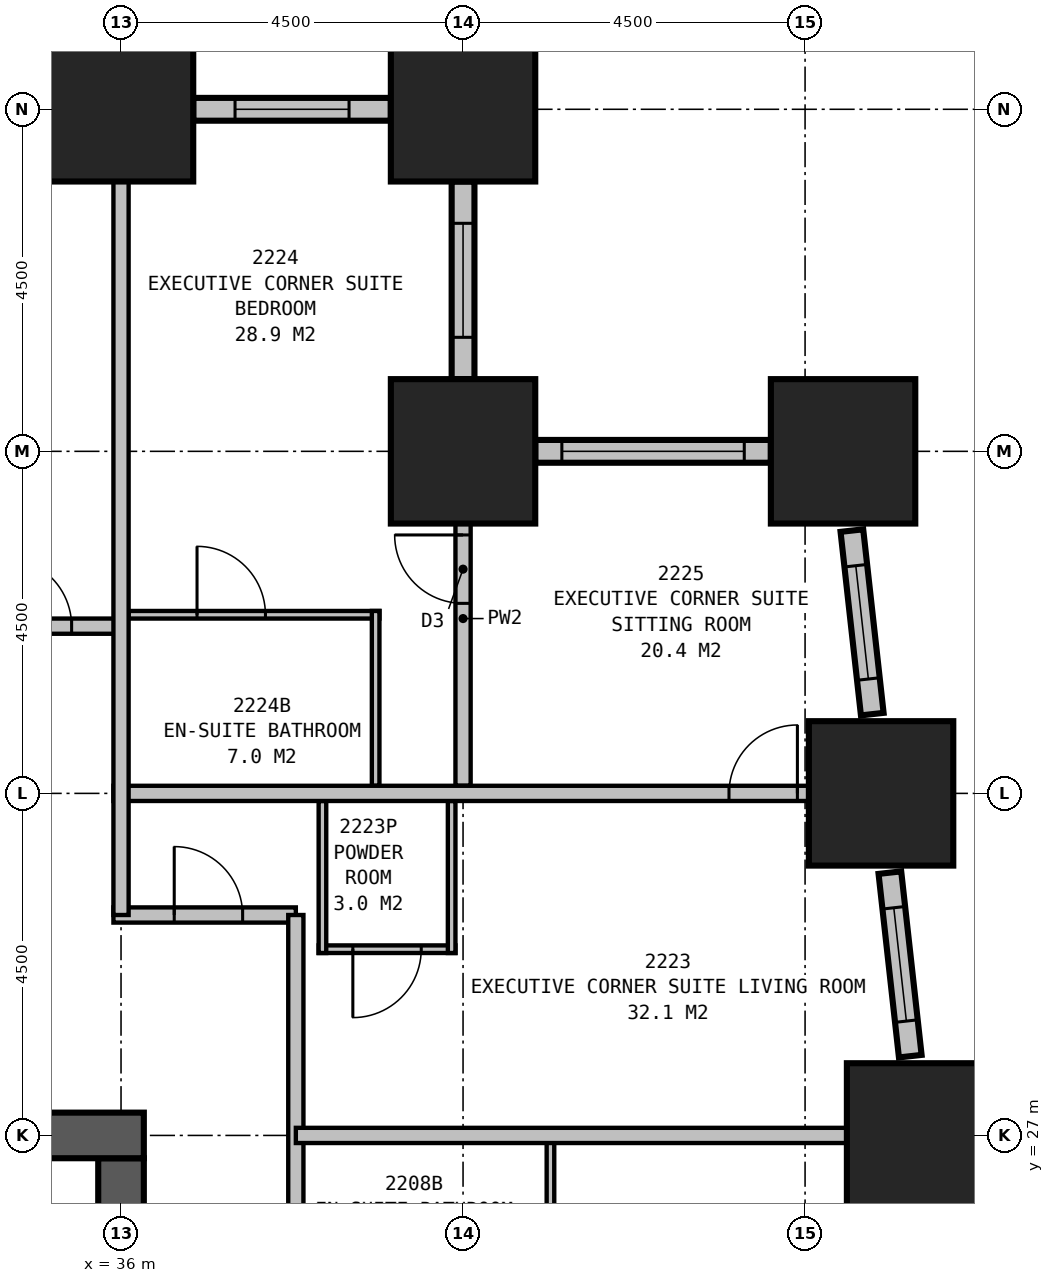
"""IFC4 building model, lengths in metres.
Left out: names, types, materials, properties, quantities, classifications, styles, units other than length and angle.
Written with IfcOpenShell. Run it as: python <this file> out.ifc"""

import sys

from ifc_helpers import new_model, si_unit, direction, frame, frame_2d, origin, origin_2d, place, context, subcontext, project, spatial, rectangle, extrude, element, fill, save


model = new_model("IFC4")
c1 = context("Model", 3, precision=1e-05, world=origin(), true_north=direction((0.0, 1.0)))
c2 = subcontext(c1, "Body", "Model", "MODEL_VIEW")
j1 = project(units=[si_unit("LENGTHUNIT", "METRE"), si_unit("PLANEANGLEUNIT", "RADIAN")], contexts=[c1])
p1 = place(None, origin())
s1 = spatial("IfcSite", under=j1, at=p1, CompositionType="ELEMENT")
p2 = place(p1, origin())
s2 = spatial("IfcBuilding", under=s1, at=p2, CompositionType="ELEMENT")
p3 = place(p2, frame((0.0, 0.0, 89.9)))
s3 = spatial("IfcBuildingStorey", under=s2, at=p3, CompositionType="ELEMENT", Elevation=89.9)
for number, where, z_axis, x_axis in (
    (1, (46.5, 27.0, 0.0), (0.0, 0.0, 1.0), (1.0, 0.0, 0.0)),
    (2, (46.0, 31.5, 0.0), (0.0, 0.0, 1.0), (1.0, 0.0, 0.0)),
    (3, (45.5, 36.0, 0.0), (0.0, 0.0, 1.0), (1.0, 0.0, 0.0)),
    (4, (40.5, 36.0, 0.0), (0.0, 0.0, 1.0), (1.0, 0.0, 0.0)),
    (5, (40.5, 40.5, 0.0), (0.0, 0.0, 1.0), (1.0, 0.0, 0.0)),
    (6, (36.0, 40.5, 0.0), (0.0, 0.0, 1.0), (1.0, 0.0, 0.0)),
):
    element("IfcColumn", number, at=place(p3, frame(where, z_axis=z_axis, x_axis=x_axis)), inside=s3, PredefinedType="COLUMN", context=c2, shape_type="SweptSolid", body=[
        extrude(rectangle(XDim=1.9, YDim=1.9, at=origin_2d()), origin(), (0.0, 0.0, 1.0), 3.5),
    ])
p4 = place(p3, frame((36.3, 27.0, 0.0), z_axis=(0.0, 0.0, 1.0), x_axis=(-1.0, 0.0, 0.0)))
e7 = element("IfcWall", 7, at=p4, inside=s3, PredefinedType="SHEAR", context=c2, shape_type="SweptSolid", body=[
    extrude(rectangle(XDim=23.1, YDim=0.6, at=frame_2d((11.55, 0.0))), origin(), (0.0, 0.0, 1.0), 3.5),
])
p5 = place(p4, frame((17.05, 0.0, 0.0)))
e8 = element("IfcOpeningElement", 8, at=p5, cuts=e7, PredefinedType="OPENING", context=c2, shape_type="SweptSolid", body=[
    extrude(rectangle(XDim=1.0, YDim=2.1, at=frame_2d((0.5, 1.05))), frame((0.0, 0.31, 0.0), z_axis=(0.0, -1.0, 0.0), x_axis=(1.0, 0.0, 0.0)), (0.0, 0.0, 1.0), 0.62),
])
p6 = place(p4, frame((12.05, 0.0, 0.0)))
e9 = element("IfcOpeningElement", 9, at=p6, cuts=e7, PredefinedType="OPENING", context=c2, shape_type="SweptSolid", body=[
    extrude(rectangle(XDim=1.0, YDim=2.1, at=frame_2d((0.5, 1.05))), frame((0.0, 0.31, 0.0), z_axis=(0.0, -1.0, 0.0), x_axis=(1.0, 0.0, 0.0)), (0.0, 0.0, 1.0), 0.62),
])
p7 = place(p4, frame((7.05, 0.0, 0.0)))
e10 = element("IfcOpeningElement", 10, at=p7, cuts=e7, PredefinedType="OPENING", context=c2, shape_type="SweptSolid", body=[
    extrude(rectangle(XDim=1.0, YDim=2.1, at=frame_2d((0.5, 1.05))), frame((0.0, 0.31, 0.0), z_axis=(0.0, -1.0, 0.0), x_axis=(1.0, 0.0, 0.0)), (0.0, 0.0, 1.0), 0.62),
])
p8 = place(p3, frame((36.0, 20.0, 0.0), z_axis=(0.0, 0.0, 1.0), x_axis=(0.0, 1.0, 0.0)))
e11 = element("IfcWall", 11, at=p8, inside=s3, PredefinedType="SHEAR", context=c2, shape_type="SweptSolid", body=[
    extrude(rectangle(XDim=6.7, YDim=0.6, at=frame_2d((3.35, 0.0))), origin(), (0.0, 0.0, 1.0), 3.5),
])
p9 = place(p3, frame((46.384, 28.043, 0.0), z_axis=(0.0, 0.0, 1.0), x_axis=(-0.110343286306, 0.993893535127, 0.0)))
e12 = element("IfcWall", 12, at=p9, inside=s3, PredefinedType="STANDARD", context=c2, shape_type="SweptSolid", body=[
    extrude(rectangle(XDim=2.429, YDim=0.3, at=frame_2d((1.215, 0.0))), origin(), (0.0, 0.0, 1.0), 2.15),
])
p10 = place(p9, frame((0.464, 0.0, 0.5)))
e13 = element("IfcOpeningElement", 13, at=p10, cuts=e12, PredefinedType="OPENING", context=c2, shape_type="SweptSolid", body=[
    extrude(rectangle(XDim=1.5, YDim=1.5, at=frame_2d((0.75, 0.75))), frame((0.0, 0.16, 0.0), z_axis=(0.0, -1.0, 0.0), x_axis=(1.0, 0.0, 0.0)), (0.0, 0.0, 1.0), 0.32),
])
p11 = place(p3, frame((45.884, 32.543, 0.0), z_axis=(0.0, 0.0, 1.0), x_axis=(-0.110343286306, 0.993893535127, 0.0)))
e14 = element("IfcWall", 14, at=p11, inside=s3, PredefinedType="STANDARD", context=c2, shape_type="SweptSolid", body=[
    extrude(rectangle(XDim=2.429, YDim=0.3, at=frame_2d((1.215, 0.0))), origin(), (0.0, 0.0, 1.0), 2.15),
])
p12 = place(p11, frame((0.465, 0.0, 0.5)))
e15 = element("IfcOpeningElement", 15, at=p12, cuts=e14, PredefinedType="OPENING", context=c2, shape_type="SweptSolid", body=[
    extrude(rectangle(XDim=1.5, YDim=1.5, at=frame_2d((0.75, 0.75))), frame((0.0, 0.16, 0.0), z_axis=(0.0, -1.0, 0.0), x_axis=(1.0, 0.0, 0.0)), (0.0, 0.0, 1.0), 0.32),
])
p13 = place(p3, frame((44.55, 36.0, 0.0), z_axis=(0.0, 0.0, 1.0), x_axis=(-1.0, 0.0, 0.0)))
e16 = element("IfcWall", 16, at=p13, inside=s3, PredefinedType="STANDARD", context=c2, shape_type="SweptSolid", body=[
    extrude(rectangle(XDim=3.1, YDim=0.3, at=frame_2d((1.55, 0.0))), origin(), (0.0, 0.0, 1.0), 2.15),
])
p14 = place(p13, frame((0.35, 0.0, 0.5)))
e17 = element("IfcOpeningElement", 17, at=p14, cuts=e16, PredefinedType="OPENING", context=c2, shape_type="SweptSolid", body=[
    extrude(rectangle(XDim=2.4, YDim=1.5, at=frame_2d((1.2, 0.75))), frame((0.0, 0.16, 0.0), z_axis=(0.0, -1.0, 0.0), x_axis=(1.0, 0.0, 0.0)), (0.0, 0.0, 1.0), 0.32),
])
p15 = place(p3, frame((40.5, 36.95, 0.0), z_axis=(0.0, 0.0, 1.0), x_axis=(0.0, 1.0, 0.0)))
e18 = element("IfcWall", 18, at=p15, inside=s3, PredefinedType="STANDARD", context=c2, shape_type="SweptSolid", body=[
    extrude(rectangle(XDim=2.6, YDim=0.3, at=frame_2d((1.3, 0.0))), origin(), (0.0, 0.0, 1.0), 2.15),
])
p16 = place(p15, frame((0.55, 0.0, 0.5)))
e19 = element("IfcOpeningElement", 19, at=p16, cuts=e18, PredefinedType="OPENING", context=c2, shape_type="SweptSolid", body=[
    extrude(rectangle(XDim=1.5, YDim=1.5, at=frame_2d((0.75, 0.75))), frame((0.0, 0.16, 0.0), z_axis=(0.0, -1.0, 0.0), x_axis=(1.0, 0.0, 0.0)), (0.0, 0.0, 1.0), 0.32),
])
p17 = place(p3, frame((39.55, 40.5, 0.0), z_axis=(0.0, 0.0, 1.0), x_axis=(-1.0, 0.0, 0.0)))
e20 = element("IfcWall", 20, at=p17, inside=s3, PredefinedType="STANDARD", context=c2, shape_type="SweptSolid", body=[
    extrude(rectangle(XDim=2.6, YDim=0.3, at=frame_2d((1.3, 0.0))), origin(), (0.0, 0.0, 1.0), 2.15),
])
p18 = place(p17, frame((0.55, 0.0, 0.5)))
e21 = element("IfcOpeningElement", 21, at=p18, cuts=e20, PredefinedType="OPENING", context=c2, shape_type="SweptSolid", body=[
    extrude(rectangle(XDim=1.5, YDim=1.5, at=frame_2d((0.75, 0.75))), frame((0.0, 0.16, 0.0), z_axis=(0.0, -1.0, 0.0), x_axis=(1.0, 0.0, 0.0)), (0.0, 0.0, 1.0), 0.32),
])
p19 = place(p3, frame((13.5, 33.7, 0.0), z_axis=(0.0, 0.0, 1.0), x_axis=(1.0, 0.0, 0.0)))
e22 = element("IfcWall", 22, at=p19, inside=s3, PredefinedType="PARTITIONING", context=c2, shape_type="SweptSolid", body=[
    extrude(rectangle(XDim=22.5, YDim=0.2, at=frame_2d((11.25, 0.0))), origin(), (0.0, 0.0, 1.0), 3.25),
])
p20 = place(p19, frame((2.95, 0.0, 0.0)))
e23 = element("IfcOpeningElement", 23, at=p20, cuts=e22, PredefinedType="OPENING", context=c2, shape_type="SweptSolid", body=[
    extrude(rectangle(XDim=0.9, YDim=2.1, at=frame_2d((0.45, 1.05))), frame((0.0, 0.11, 0.0), z_axis=(0.0, -1.0, 0.0), x_axis=(1.0, 0.0, 0.0)), (0.0, 0.0, 1.0), 0.22),
])
p21 = place(p19, frame((7.45, 0.0, 0.0)))
e24 = element("IfcOpeningElement", 24, at=p21, cuts=e22, PredefinedType="OPENING", context=c2, shape_type="SweptSolid", body=[
    extrude(rectangle(XDim=0.9, YDim=2.1, at=frame_2d((0.45, 1.05))), frame((0.0, 0.11, 0.0), z_axis=(0.0, -1.0, 0.0), x_axis=(1.0, 0.0, 0.0)), (0.0, 0.0, 1.0), 0.22),
])
p22 = place(p19, frame((9.65, 0.0, 0.0)))
e25 = element("IfcOpeningElement", 25, at=p22, cuts=e22, PredefinedType="OPENING", context=c2, shape_type="SweptSolid", body=[
    extrude(rectangle(XDim=0.9, YDim=2.1, at=frame_2d((0.45, 1.05))), frame((0.0, 0.11, 0.0), z_axis=(0.0, -1.0, 0.0), x_axis=(1.0, 0.0, 0.0)), (0.0, 0.0, 1.0), 0.22),
])
p23 = place(p19, frame((16.45, 0.0, 0.0)))
e26 = element("IfcOpeningElement", 26, at=p23, cuts=e22, PredefinedType="OPENING", context=c2, shape_type="SweptSolid", body=[
    extrude(rectangle(XDim=0.9, YDim=2.1, at=frame_2d((0.45, 1.05))), frame((0.0, 0.11, 0.0), z_axis=(0.0, -1.0, 0.0), x_axis=(1.0, 0.0, 0.0)), (0.0, 0.0, 1.0), 0.22),
])
p24 = place(p19, frame((20.95, 0.0, 0.0)))
e27 = element("IfcOpeningElement", 27, at=p24, cuts=e22, PredefinedType="OPENING", context=c2, shape_type="SweptSolid", body=[
    extrude(rectangle(XDim=0.9, YDim=2.1, at=frame_2d((0.45, 1.05))), frame((0.0, 0.11, 0.0), z_axis=(0.0, -1.0, 0.0), x_axis=(1.0, 0.0, 0.0)), (0.0, 0.0, 1.0), 0.22),
])
p25 = place(p3, frame((35.9, 29.9, 0.0), z_axis=(0.0, 0.0, 1.0), x_axis=(1.0, 0.0, 0.0)))
e28 = element("IfcWall", 28, at=p25, inside=s3, PredefinedType="PARTITIONING", context=c2, shape_type="SweptSolid", body=[
    extrude(rectangle(XDim=2.4, YDim=0.2, at=frame_2d((1.2, 0.0))), origin(), (0.0, 0.0, 1.0), 3.25),
])
p26 = place(p25, frame((0.8, 0.0, 0.0)))
e29 = element("IfcOpeningElement", 29, at=p26, cuts=e28, PredefinedType="OPENING", context=c2, shape_type="SweptSolid", body=[
    extrude(rectangle(XDim=0.9, YDim=2.1, at=frame_2d((0.45, 1.05))), frame((0.0, 0.11, 0.0), z_axis=(0.0, -1.0, 0.0), x_axis=(1.0, 0.0, 0.0)), (0.0, 0.0, 1.0), 0.22),
])
p27 = place(p3, frame((38.3, 10.6, 0.0), z_axis=(0.0, 0.0, 1.0), x_axis=(0.0, 1.0, 0.0)))
e30 = element("IfcWall", 30, at=p27, inside=s3, PredefinedType="PARTITIONING", context=c2, shape_type="SweptSolid", body=[
    extrude(rectangle(XDim=19.3, YDim=0.2, at=frame_2d((9.65, 0.0))), origin(), (0.0, 0.0, 1.0), 3.25),
])
p28 = place(p27, frame((4.65, 0.0, 0.0), z_axis=(0.0, 0.0, 1.0), x_axis=(-1.0, 0.0, 0.0)))
e31 = element("IfcOpeningElement", 31, at=p28, cuts=e30, PredefinedType="OPENING", context=c2, shape_type="SweptSolid", body=[
    extrude(rectangle(XDim=1.0, YDim=2.1, at=frame_2d((0.5, 1.05))), frame((0.0, 0.11, 0.0), z_axis=(0.0, -1.0, 0.0), x_axis=(1.0, 0.0, 0.0)), (0.0, 0.0, 1.0), 0.22),
])
p29 = place(p27, frame((9.95, 0.0, 0.0), z_axis=(0.0, 0.0, 1.0), x_axis=(-1.0, 0.0, 0.0)))
e32 = element("IfcOpeningElement", 32, at=p29, cuts=e30, PredefinedType="OPENING", context=c2, shape_type="SweptSolid", body=[
    extrude(rectangle(XDim=0.9, YDim=2.1, at=frame_2d((0.45, 1.05))), frame((0.0, 0.11, 0.0), z_axis=(0.0, -1.0, 0.0), x_axis=(1.0, 0.0, 0.0)), (0.0, 0.0, 1.0), 0.22),
])
p30 = place(p3, frame((41.65, 24.0, 0.0), z_axis=(0.0, 0.0, 1.0), x_axis=(0.0, 1.0, 0.0)))
e33 = element("IfcWall", 33, at=p30, inside=s3, PredefinedType="PLUMBINGWALL", context=c2, shape_type="SweptSolid", body=[
    extrude(rectangle(XDim=3.0, YDim=0.1, at=frame_2d((1.5, 0.0))), origin(), (0.0, 0.0, 1.0), 3.25),
])
p31 = place(p3, frame((38.3, 27.0, 0.0), z_axis=(0.0, 0.0, 1.0), x_axis=(1.0, 0.0, 0.0)))
e34 = element("IfcWall", 34, at=p31, inside=s3, PredefinedType="PARTITIONING", context=c2, shape_type="SweptSolid", body=[
    extrude(rectangle(XDim=7.977, YDim=0.2, at=frame_2d((3.988, 0.0))), origin(), (0.0, 0.0, 1.0), 1.95),
])
p32 = place(p3, frame((36.0, 29.9, 0.0), z_axis=(0.0, 0.0, 1.0), x_axis=(0.0, 1.0, 0.0)))
e35 = element("IfcWall", 35, at=p32, inside=s3, PredefinedType="PARTITIONING", context=c2, shape_type="SweptSolid", body=[
    extrude(rectangle(XDim=10.6, YDim=0.2, at=frame_2d((5.3, 0.0))), origin(), (0.0, 0.0, 1.0), 2.25),
])
p33 = place(p3, frame((35.9, 31.5, 0.0), z_axis=(0.0, 0.0, 1.0), x_axis=(1.0, 0.0, 0.0)))
e36 = element("IfcWall", 36, at=p33, inside=s3, PredefinedType="PARTITIONING", context=c2, shape_type="SweptSolid", body=[
    extrude(rectangle(XDim=10.099, YDim=0.2, at=frame_2d((5.05, 0.0))), origin(), (0.0, 0.0, 1.0), 3.25),
])
p34 = place(p33, frame((8.099, 0.0, 0.0)))
e37 = element("IfcOpeningElement", 37, at=p34, cuts=e36, PredefinedType="OPENING", context=c2, shape_type="SweptSolid", body=[
    extrude(rectangle(XDim=0.9, YDim=2.1, at=frame_2d((0.45, 1.05))), frame((0.0, 0.11, 0.0), z_axis=(0.0, -1.0, 0.0), x_axis=(1.0, 0.0, 0.0)), (0.0, 0.0, 1.0), 0.22),
])
p35 = place(p3, frame((40.35, 31.4, 0.0), z_axis=(0.0, 0.0, 1.0), x_axis=(0.0, -1.0, 0.0)))
e38 = element("IfcWall", 38, at=p35, inside=s3, PredefinedType="PLUMBINGWALL", context=c2, shape_type="SweptSolid", body=[
    extrude(rectangle(XDim=2.0, YDim=0.1, at=frame_2d((1.0, 0.0))), origin(), (0.0, 0.0, 1.0), 2.25),
])
p36 = place(p3, frame((38.65, 31.4, 0.0), z_axis=(0.0, 0.0, 1.0), x_axis=(0.0, -1.0, 0.0)))
e39 = element("IfcWall", 39, at=p36, inside=s3, PredefinedType="PLUMBINGWALL", context=c2, shape_type="SweptSolid", body=[
    extrude(rectangle(XDim=2.0, YDim=0.1, at=frame_2d((1.0, 0.0))), origin(), (0.0, 0.0, 1.0), 3.25),
])
p37 = place(p3, frame((38.6, 29.45, 0.0), z_axis=(0.0, 0.0, 1.0), x_axis=(1.0, 0.0, 0.0)))
e40 = element("IfcWall", 40, at=p37, inside=s3, PredefinedType="PLUMBINGWALL", context=c2, shape_type="SweptSolid", body=[
    extrude(rectangle(XDim=1.8, YDim=0.1, at=frame_2d((0.9, 0.0))), origin(), (0.0, 0.0, 1.0), 3.25),
])
p38 = place(p37, frame((1.35, 0.0, 0.0), z_axis=(0.0, 0.0, 1.0), x_axis=(-1.0, 0.0, 0.0)))
e41 = element("IfcOpeningElement", 41, at=p38, cuts=e40, PredefinedType="OPENING", context=c2, shape_type="SweptSolid", body=[
    extrude(rectangle(XDim=0.9, YDim=2.1, at=frame_2d((0.45, 1.05))), frame((0.0, 0.06, 0.0), z_axis=(0.0, -1.0, 0.0), x_axis=(1.0, 0.0, 0.0)), (0.0, 0.0, 1.0), 0.12),
])
p39 = place(p3, frame((40.5, 31.6, 0.0), z_axis=(0.0, 0.0, 1.0), x_axis=(0.0, 1.0, 0.0)))
e42 = element("IfcWall", 42, at=p39, inside=s3, PredefinedType="PARTITIONING", context=c2, shape_type="SweptSolid", body=[
    extrude(rectangle(XDim=4.4, YDim=0.2, at=frame_2d((2.2, 0.0))), origin(), (0.0, 0.0, 1.0), 2.25),
])
p40 = place(p39, frame((2.4, 0.0, 0.0)))
e43 = element("IfcOpeningElement", 43, at=p40, cuts=e42, PredefinedType="OPENING", context=c2, shape_type="SweptSolid", body=[
    extrude(rectangle(XDim=0.9, YDim=2.1, at=frame_2d((0.45, 1.05))), frame((0.0, 0.11, 0.0), z_axis=(0.0, -1.0, 0.0), x_axis=(1.0, 0.0, 0.0)), (0.0, 0.0, 1.0), 0.22),
])
p41 = place(p3, frame((39.35, 31.6, 0.0), z_axis=(0.0, 0.0, 1.0), x_axis=(0.0, 1.0, 0.0)))
e44 = element("IfcWall", 44, at=p41, inside=s3, PredefinedType="PLUMBINGWALL", context=c2, shape_type="SweptSolid", body=[
    extrude(rectangle(XDim=2.3, YDim=0.1, at=frame_2d((1.15, 0.0))), origin(), (0.0, 0.0, 1.0), 3.25),
])
p42 = place(p3, frame((36.1, 33.85, 0.0), z_axis=(0.0, 0.0, 1.0), x_axis=(1.0, 0.0, 0.0)))
e45 = element("IfcWall", 45, at=p42, inside=s3, PredefinedType="PLUMBINGWALL", context=c2, shape_type="SweptSolid", body=[
    extrude(rectangle(XDim=3.3, YDim=0.1, at=frame_2d((1.65, 0.0))), origin(), (0.0, 0.0, 1.0), 3.25),
])
p43 = place(p42, frame((0.9, 0.0, 0.0)))
e46 = element("IfcOpeningElement", 46, at=p43, cuts=e45, PredefinedType="OPENING", context=c2, shape_type="SweptSolid", body=[
    extrude(rectangle(XDim=0.9, YDim=2.1, at=frame_2d((0.45, 1.05))), frame((0.0, 0.06, 0.0), z_axis=(0.0, -1.0, 0.0), x_axis=(1.0, 0.0, 0.0)), (0.0, 0.0, 1.0), 0.12),
])
p44 = place(p10, origin())
e47 = element("IfcWindow", 47, at=p44, inside=s3, PartitioningType="SINGLE_PANEL", PredefinedType="WINDOW", context=c2, shape_type="SweptSolid", body=[
    extrude(rectangle(XDim=1.5, YDim=1.5, at=frame_2d((0.75, 0.75))), frame((0.0, 0.03, 0.0), z_axis=(0.0, -1.0, 0.0), x_axis=(1.0, 0.0, 0.0)), (0.0, 0.0, 1.0), 0.06),
])
fill(e13, e47)
p45 = place(p12, origin())
e48 = element("IfcWindow", 48, at=p45, inside=s3, PartitioningType="SINGLE_PANEL", PredefinedType="WINDOW", context=c2, shape_type="SweptSolid", body=[
    extrude(rectangle(XDim=1.5, YDim=1.5, at=frame_2d((0.75, 0.75))), frame((0.0, 0.03, 0.0), z_axis=(0.0, -1.0, 0.0), x_axis=(1.0, 0.0, 0.0)), (0.0, 0.0, 1.0), 0.06),
])
fill(e15, e48)
p46 = place(p14, origin())
e49 = element("IfcWindow", 49, at=p46, inside=s3, PartitioningType="SINGLE_PANEL", PredefinedType="WINDOW", context=c2, shape_type="SweptSolid", body=[
    extrude(rectangle(XDim=2.4, YDim=1.5, at=frame_2d((1.2, 0.75))), frame((0.0, 0.03, 0.0), z_axis=(0.0, -1.0, 0.0), x_axis=(1.0, 0.0, 0.0)), (0.0, 0.0, 1.0), 0.06),
])
fill(e17, e49)
p47 = place(p16, origin())
e50 = element("IfcWindow", 50, at=p47, inside=s3, PartitioningType="SINGLE_PANEL", PredefinedType="WINDOW", context=c2, shape_type="SweptSolid", body=[
    extrude(rectangle(XDim=1.5, YDim=1.5, at=frame_2d((0.75, 0.75))), frame((0.0, 0.03, 0.0), z_axis=(0.0, -1.0, 0.0), x_axis=(1.0, 0.0, 0.0)), (0.0, 0.0, 1.0), 0.06),
])
fill(e19, e50)
p48 = place(p18, origin())
e51 = element("IfcWindow", 51, at=p48, inside=s3, PartitioningType="SINGLE_PANEL", PredefinedType="WINDOW", context=c2, shape_type="SweptSolid", body=[
    extrude(rectangle(XDim=1.5, YDim=1.5, at=frame_2d((0.75, 0.75))), frame((0.0, 0.03, 0.0), z_axis=(0.0, -1.0, 0.0), x_axis=(1.0, 0.0, 0.0)), (0.0, 0.0, 1.0), 0.06),
])
fill(e21, e51)
p49 = place(p24, origin())
e52 = element("IfcDoor", 52, at=p49, inside=s3, OperationType="SINGLE_SWING_LEFT", PredefinedType="DOOR", context=c2, shape_type="SweptSolid", body=[
    extrude(rectangle(XDim=0.9, YDim=2.1, at=frame_2d((0.45, 1.05))), frame((0.0, 0.025, 0.0), z_axis=(0.0, -1.0, 0.0), x_axis=(1.0, 0.0, 0.0)), (0.0, 0.0, 1.0), 0.05),
])
fill(e27, e52)
p50 = place(p26, origin())
e53 = element("IfcDoor", 53, at=p50, inside=s3, OperationType="SINGLE_SWING_LEFT", PredefinedType="DOOR", context=c2, shape_type="SweptSolid", body=[
    extrude(rectangle(XDim=0.9, YDim=2.1, at=frame_2d((0.45, 1.05))), frame((0.0, 0.025, 0.0), z_axis=(0.0, -1.0, 0.0), x_axis=(1.0, 0.0, 0.0)), (0.0, 0.0, 1.0), 0.05),
])
fill(e29, e53)
p51 = place(p34, origin())
e54 = element("IfcDoor", 54, at=p51, inside=s3, OperationType="SINGLE_SWING_RIGHT", PredefinedType="DOOR", context=c2, shape_type="SweptSolid", body=[
    extrude(rectangle(XDim=0.9, YDim=2.1, at=frame_2d((0.45, 1.05))), frame((0.0, 0.025, 0.0), z_axis=(0.0, -1.0, 0.0), x_axis=(1.0, 0.0, 0.0)), (0.0, 0.0, 1.0), 0.05),
])
fill(e37, e54)
p52 = place(p38, origin())
e55 = element("IfcDoor", 55, at=p52, inside=s3, OperationType="SINGLE_SWING_RIGHT", PredefinedType="DOOR", context=c2, shape_type="SweptSolid", body=[
    extrude(rectangle(XDim=0.9, YDim=2.1, at=frame_2d((0.45, 1.05))), frame((0.0, 0.025, 0.0), z_axis=(0.0, -1.0, 0.0), x_axis=(1.0, 0.0, 0.0)), (0.0, 0.0, 1.0), 0.05),
])
fill(e41, e55)
p53 = place(p40, origin())
e56 = element("IfcDoor", 56, at=p53, inside=s3, OperationType="SINGLE_SWING_RIGHT", PredefinedType="DOOR", context=c2, shape_type="SweptSolid", body=[
    extrude(rectangle(XDim=0.9, YDim=2.1, at=frame_2d((0.45, 1.05))), frame((0.0, 0.025, 0.0), z_axis=(0.0, -1.0, 0.0), x_axis=(1.0, 0.0, 0.0)), (0.0, 0.0, 1.0), 0.05),
])
fill(e43, e56)
p54 = place(p43, origin())
e57 = element("IfcDoor", 57, at=p54, inside=s3, OperationType="SINGLE_SWING_LEFT", PredefinedType="DOOR", context=c2, shape_type="SweptSolid", body=[
    extrude(rectangle(XDim=0.9, YDim=2.1, at=frame_2d((0.45, 1.05))), frame((0.0, 0.025, 0.0), z_axis=(0.0, -1.0, 0.0), x_axis=(1.0, 0.0, 0.0)), (0.0, 0.0, 1.0), 0.05),
])
fill(e46, e57)
save(model, sys.argv[1])
